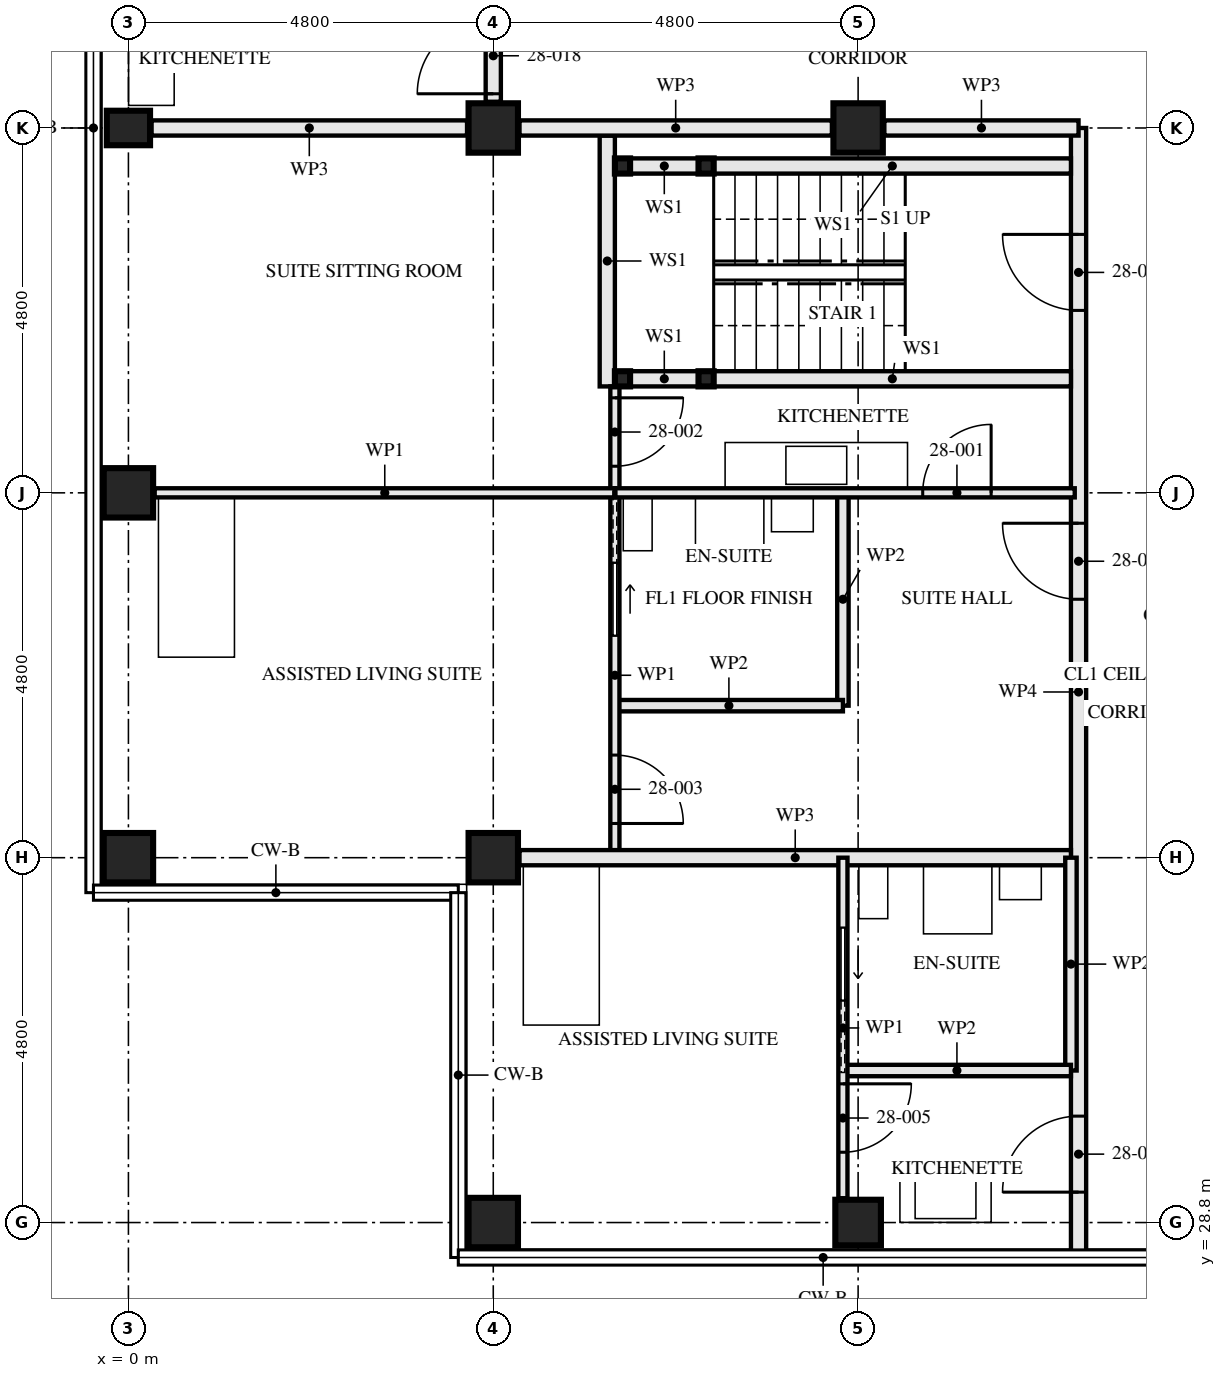
"""IFC4 building model, lengths in metres.
Left out: names, types, materials, properties, quantities, classifications, styles, units other than length and angle.
Written with IfcOpenShell. Run it as: python <this file> out.ifc"""

import sys

from ifc_helpers import new_model, si_unit, direction, frame, frame_2d, origin, origin_2d, place, context, subcontext, project, spatial, rectangle, hollow_rectangle, i_section, extrude, element, fill, save


model = new_model("IFC4")
c1 = context("Model", 3, precision=1e-05, world=origin(), true_north=direction((0.0, 1.0)))
c2 = subcontext(c1, "Body", "Model", "MODEL_VIEW")
j1 = project(units=[si_unit("LENGTHUNIT", "METRE"), si_unit("PLANEANGLEUNIT", "RADIAN")], contexts=[c1])
p1 = place(None, origin())
s1 = spatial("IfcSite", under=j1, at=p1, CompositionType="ELEMENT")
p2 = place(p1, origin())
s2 = spatial("IfcBuilding", under=s1, at=p2, CompositionType="ELEMENT")
p3 = place(p2, frame((0.0, 0.0, 105.0)))
s3 = spatial("IfcBuildingStorey", under=s2, at=p3, CompositionType="ELEMENT", Elevation=105.0)
for number, where, z_axis, x_axis in (
    (1, (0.0, 33.6, 0.0), (0.0, 0.0, 1.0), (0.0, 1.0, 0.0)),
    (2, (0.0, 38.4, 0.0), (0.0, 0.0, 1.0), (1.0, 0.0, 0.0)),
):
    element("IfcColumn", number, at=place(p3, frame(where, z_axis=z_axis, x_axis=x_axis)), inside=s3, PredefinedType="COLUMN", context=c2, shape_type="SweptSolid", body=[
        extrude(hollow_rectangle(XDim=0.65, YDim=0.65, WallThickness=0.08, at=origin_2d()), origin(), (0.0, 0.0, 1.0), 3.5),
    ])
p4 = place(p3, frame((0.0, 43.2, 0.0), z_axis=(0.0, 0.0, 1.0), x_axis=(0.0, 1.0, 0.0)))
e3 = element("IfcColumn", 3, at=p4, inside=s3, PredefinedType="COLUMN", context=c2, shape_type="SweptSolid", body=[
    extrude(i_section(OverallWidth=0.454, OverallDepth=0.569, WebThickness=0.078, FlangeThickness=0.125, FilletRadius=0.015, at=origin_2d()), origin(), (0.0, 0.0, 1.0), 3.5),
])
for number, where, z_axis, x_axis in (
    (4, (4.8, 28.8, 0.0), (0.0, 0.0, 1.0), (0.0, 1.0, 0.0)),
    (5, (4.8, 33.6, 0.0), (0.0, 0.0, 1.0), (0.0, 1.0, 0.0)),
):
    element("IfcColumn", number, at=place(p3, frame(where, z_axis=z_axis, x_axis=x_axis)), inside=s3, PredefinedType="COLUMN", context=c2, shape_type="SweptSolid", body=[
        extrude(hollow_rectangle(XDim=0.65, YDim=0.65, WallThickness=0.08, at=origin_2d()), origin(), (0.0, 0.0, 1.0), 3.5),
    ])
p5 = place(p3, frame((4.8, 43.2, 0.0), z_axis=(0.0, 0.0, 1.0), x_axis=(0.0, 1.0, 0.0)))
e6 = element("IfcColumn", 6, at=p5, inside=s3, PredefinedType="COLUMN", context=c2, shape_type="SweptSolid", body=[
    extrude(hollow_rectangle(XDim=0.65, YDim=0.65, WallThickness=0.05, at=origin_2d()), origin(), (0.0, 0.0, 1.0), 3.5),
])
p6 = place(p3, frame((9.6, 28.8, 0.0), z_axis=(0.0, 0.0, 1.0), x_axis=(0.0, 1.0, 0.0)))
e7 = element("IfcColumn", 7, at=p6, inside=s3, PredefinedType="COLUMN", context=c2, shape_type="SweptSolid", body=[
    extrude(hollow_rectangle(XDim=0.6, YDim=0.6, WallThickness=0.08, at=origin_2d()), origin(), (0.0, 0.0, 1.0), 3.5),
])
p7 = place(p3, frame((9.6, 43.2, 0.0), z_axis=(0.0, 0.0, 1.0), x_axis=(0.0, 1.0, 0.0)))
e8 = element("IfcColumn", 8, at=p7, inside=s3, PredefinedType="COLUMN", context=c2, shape_type="SweptSolid", body=[
    extrude(hollow_rectangle(XDim=0.65, YDim=0.65, WallThickness=0.05, at=origin_2d()), origin(), (0.0, 0.0, 1.0), 3.5),
])
for number, where, z_axis, x_axis in (
    (9, (6.5, 42.7, 0.0), (0.0, 0.0, 1.0), (1.0, 0.0, 0.0)),
    (10, (6.5, 39.9, 0.0), (0.0, 0.0, 1.0), (1.0, 0.0, 0.0)),
    (11, (7.6, 42.7, 0.0), (0.0, 0.0, 1.0), (1.0, 0.0, 0.0)),
    (12, (7.6, 39.9, 0.0), (0.0, 0.0, 1.0), (1.0, 0.0, 0.0)),
):
    element("IfcColumn", number, at=place(p3, frame(where, z_axis=z_axis, x_axis=x_axis)), inside=s3, PredefinedType="COLUMN", context=c2, shape_type="SweptSolid", body=[
        extrude(hollow_rectangle(XDim=0.2, YDim=0.2, WallThickness=0.008, at=origin_2d()), origin(), (0.0, 0.0, 1.0), 3.33),
    ])
p8 = place(p3, frame((6.6, 42.7, 0.0), z_axis=(0.0, 0.0, 1.0), x_axis=(1.0, 0.0, 0.0)))
e13 = element("IfcWall", 13, at=p8, inside=s3, PredefinedType="SOLIDWALL", context=c2, shape_type="SweptSolid", body=[
    extrude(rectangle(XDim=0.9, YDim=0.2, at=frame_2d((0.45, 0.0))), origin(), (0.0, 0.0, 1.0), 2.99),
])
p9 = place(p3, frame((7.7, 42.7, 0.0), z_axis=(0.0, 0.0, 1.0), x_axis=(1.0, 0.0, 0.0)))
e14 = element("IfcWall", 14, at=p9, inside=s3, PredefinedType="SOLIDWALL", context=c2, shape_type="SweptSolid", body=[
    extrude(rectangle(XDim=4.7, YDim=0.2, at=frame_2d((2.35, 0.0))), origin(), (0.0, 0.0, 1.0), 2.99),
])
p10 = place(p3, frame((6.6, 39.9, 0.0), z_axis=(0.0, 0.0, 1.0), x_axis=(1.0, 0.0, 0.0)))
e15 = element("IfcWall", 15, at=p10, inside=s3, PredefinedType="SOLIDWALL", context=c2, shape_type="SweptSolid", body=[
    extrude(rectangle(XDim=0.9, YDim=0.2, at=frame_2d((0.45, 0.0))), origin(), (0.0, 0.0, 1.0), 2.99),
])
p11 = place(p3, frame((7.7, 39.9, 0.0), z_axis=(0.0, 0.0, 1.0), x_axis=(1.0, 0.0, 0.0)))
e16 = element("IfcWall", 16, at=p11, inside=s3, PredefinedType="SOLIDWALL", context=c2, shape_type="SweptSolid", body=[
    extrude(rectangle(XDim=4.7, YDim=0.2, at=frame_2d((2.35, 0.0))), origin(), (0.0, 0.0, 1.0), 2.99),
])
p12 = place(p3, frame((6.3, 43.1, 0.0), z_axis=(0.0, 0.0, 1.0), x_axis=(0.0, -1.0, 0.0)))
e17 = element("IfcWall", 17, at=p12, inside=s3, PredefinedType="SOLIDWALL", context=c2, shape_type="SweptSolid", body=[
    extrude(rectangle(XDim=3.3, YDim=0.2, at=frame_2d((1.65, 0.0))), origin(), (0.0, 0.0, 1.0), 3.33),
])
p13 = place(p3, frame((6.4, 35.6, 0.0), z_axis=(0.0, 0.0, 1.0), x_axis=(1.0, 0.0, 0.0)))
e18 = element("IfcWall", 18, at=p13, inside=s3, PredefinedType="PARTITIONING", context=c2, shape_type="SweptSolid", body=[
    extrude(rectangle(XDim=3.0, YDim=0.15, at=frame_2d((1.5, 0.0))), origin(), (0.0, 0.0, 1.0), 3.33),
])
p14 = place(p3, frame((9.4, 38.4, 0.0), z_axis=(0.0, 0.0, 1.0), x_axis=(0.0, -1.0, 0.0)))
e19 = element("IfcWall", 19, at=p14, inside=s3, PredefinedType="PARTITIONING", context=c2, shape_type="SweptSolid", body=[
    extrude(rectangle(XDim=2.8, YDim=0.15, at=frame_2d((1.4, 0.0))), origin(), (0.0, 0.0, 1.0), 3.33),
])
p15 = place(p3, frame((6.4, 38.4, 0.0), z_axis=(0.0, 0.0, 1.0), x_axis=(1.0, 0.0, 0.0)))
e20 = element("IfcWall", 20, at=p15, inside=s3, PredefinedType="PARTITIONING", context=c2, shape_type="SweptSolid", body=[
    extrude(rectangle(XDim=6.05, YDim=0.12, at=frame_2d((3.025, 0.0))), origin(), (0.0, 0.0, 1.0), 2.55),
])
p16 = place(p15, frame((4.05, 0.0, 0.0)))
e21 = element("IfcOpeningElement", 21, at=p16, cuts=e20, PredefinedType="OPENING", context=c2, shape_type="SweptSolid", body=[
    extrude(rectangle(XDim=0.9, YDim=2.1, at=frame_2d((0.45, 1.05))), frame((0.0, 0.071, 0.0), z_axis=(0.0, -1.0, 0.0), x_axis=(1.0, 0.0, 0.0)), (0.0, 0.0, 1.0), 0.141),
])
p17 = place(p3, frame((6.4, 39.8, 0.0), z_axis=(0.0, 0.0, 1.0), x_axis=(0.0, -1.0, 0.0)))
e22 = element("IfcWall", 22, at=p17, inside=s3, PredefinedType="PARTITIONING", context=c2, shape_type="SweptSolid", body=[
    extrude(rectangle(XDim=1.4, YDim=0.12, at=frame_2d((0.7, 0.0))), origin(), (0.0, 0.0, 1.0), 3.33),
])
p18 = place(p17, frame((0.15, 0.0, 0.0)))
e23 = element("IfcOpeningElement", 23, at=p18, cuts=e22, PredefinedType="OPENING", context=c2, shape_type="SweptSolid", body=[
    extrude(rectangle(XDim=0.9, YDim=2.1, at=frame_2d((0.45, 1.05))), frame((0.0, 0.071, 0.0), z_axis=(0.0, -1.0, 0.0), x_axis=(1.0, 0.0, 0.0)), (0.0, 0.0, 1.0), 0.141),
])
p19 = place(p3, frame((6.4, 38.4, 0.0), z_axis=(0.0, 0.0, 1.0), x_axis=(0.0, -1.0, 0.0)))
e24 = element("IfcWall", 24, at=p19, inside=s3, PredefinedType="PARTITIONING", context=c2, shape_type="SweptSolid", body=[
    extrude(rectangle(XDim=4.8, YDim=0.12, at=frame_2d((2.4, 0.0))), origin(), (0.0, 0.0, 1.0), 3.33),
])
p20 = place(p19, frame((3.45, 0.0, 0.0)))
e25 = element("IfcOpeningElement", 25, at=p20, cuts=e24, PredefinedType="OPENING", context=c2, shape_type="SweptSolid", body=[
    extrude(rectangle(XDim=0.9, YDim=2.1, at=frame_2d((0.45, 1.05))), frame((0.0, 0.071, 0.0), z_axis=(0.0, -1.0, 0.0), x_axis=(1.0, 0.0, 0.0)), (0.0, 0.0, 1.0), 0.141),
])
p21 = place(p19, frame((0.925, 0.0, 0.0)))
e26 = element("IfcOpeningElement", 26, at=p21, cuts=e24, PredefinedType="OPENING", context=c2, shape_type="SweptSolid", body=[
    extrude(rectangle(XDim=0.95, YDim=2.1, at=frame_2d((0.475, 1.05))), frame((0.0, 0.071, 0.0), z_axis=(0.0, -1.0, 0.0), x_axis=(1.0, 0.0, 0.0)), (0.0, 0.0, 1.0), 0.141),
])
p22 = place(p3, frame((0.345, 38.4, 0.0), z_axis=(0.0, 0.0, 1.0), x_axis=(1.0, 0.0, 0.0)))
e27 = element("IfcWall", 27, at=p22, inside=s3, PredefinedType="PARTITIONING", context=c2, shape_type="SweptSolid", body=[
    extrude(rectangle(XDim=6.055, YDim=0.12, at=frame_2d((3.027, 0.0))), origin(), (0.0, 0.0, 1.0), 2.55),
])
p23 = place(p3, frame((5.145, 33.6, 0.0), z_axis=(0.0, 0.0, 1.0), x_axis=(1.0, 0.0, 0.0)))
e28 = element("IfcWall", 28, at=p23, inside=s3, PredefinedType="PARTITIONING", context=c2, shape_type="SweptSolid", body=[
    extrude(rectangle(XDim=7.255, YDim=0.2, at=frame_2d((3.627, 0.0))), origin(), (0.0, 0.0, 1.0), 2.55),
])
p24 = place(p3, frame((9.4, 30.8, 0.0), z_axis=(0.0, 0.0, 1.0), x_axis=(1.0, 0.0, 0.0)))
e29 = element("IfcWall", 29, at=p24, inside=s3, PredefinedType="PARTITIONING", context=c2, shape_type="SweptSolid", body=[
    extrude(rectangle(XDim=3.0, YDim=0.15, at=frame_2d((1.5, 0.0))), origin(), (0.0, 0.0, 1.0), 3.33),
])
p25 = place(p3, frame((12.4, 33.6, 0.0), z_axis=(0.0, 0.0, 1.0), x_axis=(0.0, -1.0, 0.0)))
e30 = element("IfcWall", 30, at=p25, inside=s3, PredefinedType="PARTITIONING", context=c2, shape_type="SweptSolid", body=[
    extrude(rectangle(XDim=2.8, YDim=0.15, at=frame_2d((1.4, 0.0))), origin(), (0.0, 0.0, 1.0), 3.33),
])
p26 = place(p3, frame((9.4, 33.6, 0.0), z_axis=(0.0, 0.0, 1.0), x_axis=(0.0, -1.0, 0.0)))
e31 = element("IfcWall", 31, at=p26, inside=s3, PredefinedType="PARTITIONING", context=c2, shape_type="SweptSolid", body=[
    extrude(rectangle(XDim=4.48, YDim=0.12, at=frame_2d((2.24, 0.0))), origin(), (0.0, 0.0, 1.0), 3.33),
])
p27 = place(p26, frame((2.975, 0.0, 0.0)))
e32 = element("IfcOpeningElement", 32, at=p27, cuts=e31, PredefinedType="OPENING", context=c2, shape_type="SweptSolid", body=[
    extrude(rectangle(XDim=0.9, YDim=2.1, at=frame_2d((0.45, 1.05))), frame((0.0, 0.071, 0.0), z_axis=(0.0, -1.0, 0.0), x_axis=(1.0, 0.0, 0.0)), (0.0, 0.0, 1.0), 0.141),
])
p28 = place(p26, frame((0.925, 0.0, 0.0)))
e33 = element("IfcOpeningElement", 33, at=p28, cuts=e31, PredefinedType="OPENING", context=c2, shape_type="SweptSolid", body=[
    extrude(rectangle(XDim=0.95, YDim=2.1, at=frame_2d((0.475, 1.05))), frame((0.0, 0.071, 0.0), z_axis=(0.0, -1.0, 0.0), x_axis=(1.0, 0.0, 0.0)), (0.0, 0.0, 1.0), 0.141),
])
p29 = place(p3, frame((12.5, 43.2, 0.0), z_axis=(0.0, 0.0, 1.0), x_axis=(0.0, -1.0, 0.0)))
e34 = element("IfcWall", 34, at=p29, inside=s3, PredefinedType="PARTITIONING", context=c2, shape_type="SweptSolid", body=[
    extrude(rectangle(XDim=14.84, YDim=0.2, at=frame_2d((7.42, 0.0))), origin(), (0.0, 0.0, 1.0), 2.32),
])
p30 = place(p29, frame((1.4, 0.0, 0.0)))
e35 = element("IfcOpeningElement", 35, at=p30, cuts=e34, PredefinedType="OPENING", context=c2, shape_type="SweptSolid", body=[
    extrude(rectangle(XDim=1.0, YDim=2.1, at=frame_2d((0.5, 1.05))), frame((0.0, 0.111, 0.0), z_axis=(0.0, -1.0, 0.0), x_axis=(1.0, 0.0, 0.0)), (0.0, 0.0, 1.0), 0.221),
])
p31 = place(p29, frame((5.2, 0.0, 0.0)))
e36 = element("IfcOpeningElement", 36, at=p31, cuts=e34, PredefinedType="OPENING", context=c2, shape_type="SweptSolid", body=[
    extrude(rectangle(XDim=1.0, YDim=2.1, at=frame_2d((0.5, 1.05))), frame((0.0, 0.111, 0.0), z_axis=(0.0, -1.0, 0.0), x_axis=(1.0, 0.0, 0.0)), (0.0, 0.0, 1.0), 0.221),
])
p32 = place(p29, frame((13.0, 0.0, 0.0)))
e37 = element("IfcOpeningElement", 37, at=p32, cuts=e34, PredefinedType="OPENING", context=c2, shape_type="SweptSolid", body=[
    extrude(rectangle(XDim=1.0, YDim=2.1, at=frame_2d((0.5, 1.05))), frame((0.0, 0.111, 0.0), z_axis=(0.0, -1.0, 0.0), x_axis=(1.0, 0.0, 0.0)), (0.0, 0.0, 1.0), 0.221),
])
p33 = place(p3, frame((4.8, 45.2, 0.0), z_axis=(0.0, 0.0, 1.0), x_axis=(0.0, -1.0, 0.0)))
e38 = element("IfcWall", 38, at=p33, inside=s3, PredefinedType="PARTITIONING", context=c2, shape_type="SweptSolid", body=[
    extrude(rectangle(XDim=1.655, YDim=0.2, at=frame_2d((0.828, 0.0))), origin(), (0.0, 0.0, 1.0), 3.33),
])
p34 = place(p33, frame((0.55, 0.0, 0.0)))
e39 = element("IfcOpeningElement", 39, at=p34, cuts=e38, PredefinedType="OPENING", context=c2, shape_type="SweptSolid", body=[
    extrude(rectangle(XDim=1.0, YDim=2.1, at=frame_2d((0.5, 1.05))), frame((0.0, 0.111, 0.0), z_axis=(0.0, -1.0, 0.0), x_axis=(1.0, 0.0, 0.0)), (0.0, 0.0, 1.0), 0.221),
])
p35 = place(p3, frame((12.5, 43.2, 0.0), z_axis=(0.0, 0.0, 1.0), x_axis=(-1.0, 0.0, 0.0)))
e40 = element("IfcWall", 40, at=p35, inside=s3, PredefinedType="PARTITIONING", context=c2, shape_type="SweptSolid", body=[
    extrude(rectangle(XDim=2.555, YDim=0.2, at=frame_2d((1.277, 0.0))), origin(), (0.0, 0.0, 1.0), 2.32),
])
p36 = place(p3, frame((9.255, 43.2, 0.0), z_axis=(0.0, 0.0, 1.0), x_axis=(-1.0, 0.0, 0.0)))
e41 = element("IfcWall", 41, at=p36, inside=s3, PredefinedType="PARTITIONING", context=c2, shape_type="SweptSolid", body=[
    extrude(rectangle(XDim=4.11, YDim=0.2, at=frame_2d((2.055, 0.0))), origin(), (0.0, 0.0, 1.0), 2.32),
])
p37 = place(p3, frame((4.455, 43.2, 0.0), z_axis=(0.0, 0.0, 1.0), x_axis=(-1.0, 0.0, 0.0)))
e42 = element("IfcWall", 42, at=p37, inside=s3, PredefinedType="PARTITIONING", context=c2, shape_type="SweptSolid", body=[
    extrude(rectangle(XDim=4.151, YDim=0.2, at=frame_2d((2.075, 0.0))), origin(), (0.0, 0.0, 1.0), 2.32),
])
p38 = place(p16, origin())
e43 = element("IfcDoor", 43, at=p38, inside=s3, OperationType="SINGLE_SWING_LEFT", PredefinedType="DOOR", context=c2, shape_type="SweptSolid", body=[
    extrude(rectangle(XDim=0.9, YDim=2.1, at=frame_2d((0.45, 1.05))), frame((0.0, 0.022, 0.0), z_axis=(0.0, -1.0, 0.0), x_axis=(1.0, 0.0, 0.0)), (0.0, 0.0, 1.0), 0.044),
])
fill(e21, e43)
p39 = place(p18, origin())
e44 = element("IfcDoor", 44, at=p39, inside=s3, OperationType="SINGLE_SWING_RIGHT", PredefinedType="DOOR", context=c2, shape_type="SweptSolid", body=[
    extrude(rectangle(XDim=0.9, YDim=2.1, at=frame_2d((0.45, 1.05))), frame((0.0, 0.022, 0.0), z_axis=(0.0, -1.0, 0.0), x_axis=(1.0, 0.0, 0.0)), (0.0, 0.0, 1.0), 0.044),
])
fill(e23, e44)
p40 = place(p20, origin())
e45 = element("IfcDoor", 45, at=p40, inside=s3, OperationType="SINGLE_SWING_LEFT", PredefinedType="DOOR", context=c2, shape_type="SweptSolid", body=[
    extrude(rectangle(XDim=0.9, YDim=2.1, at=frame_2d((0.45, 1.05))), frame((0.0, 0.022, 0.0), z_axis=(0.0, -1.0, 0.0), x_axis=(1.0, 0.0, 0.0)), (0.0, 0.0, 1.0), 0.044),
])
fill(e25, e45)
p41 = place(p21, origin())
e46 = element("IfcDoor", 46, at=p41, inside=s3, OperationType="SLIDING_TO_RIGHT", PredefinedType="DOOR", context=c2, shape_type="SweptSolid", body=[
    extrude(rectangle(XDim=0.95, YDim=2.1, at=frame_2d((0.475, 1.05))), frame((0.0, 0.022, 0.0), z_axis=(0.0, -1.0, 0.0), x_axis=(1.0, 0.0, 0.0)), (0.0, 0.0, 1.0), 0.044),
])
fill(e26, e46)
p42 = place(p27, origin())
e47 = element("IfcDoor", 47, at=p42, inside=s3, OperationType="SINGLE_SWING_RIGHT", PredefinedType="DOOR", context=c2, shape_type="SweptSolid", body=[
    extrude(rectangle(XDim=0.9, YDim=2.1, at=frame_2d((0.45, 1.05))), frame((0.0, 0.022, 0.0), z_axis=(0.0, -1.0, 0.0), x_axis=(1.0, 0.0, 0.0)), (0.0, 0.0, 1.0), 0.044),
])
fill(e32, e47)
p43 = place(p28, origin())
e48 = element("IfcDoor", 48, at=p43, inside=s3, OperationType="SLIDING_TO_LEFT", PredefinedType="DOOR", context=c2, shape_type="SweptSolid", body=[
    extrude(rectangle(XDim=0.95, YDim=2.1, at=frame_2d((0.475, 1.05))), frame((0.0, 0.022, 0.0), z_axis=(0.0, -1.0, 0.0), x_axis=(1.0, 0.0, 0.0)), (0.0, 0.0, 1.0), 0.044),
])
fill(e33, e48)
p44 = place(p30, frame((1.0, 0.0, 0.0), z_axis=(0.0, 0.0, 1.0), x_axis=(-1.0, 0.0, 0.0)))
e49 = element("IfcDoor", 49, at=p44, inside=s3, OperationType="SINGLE_SWING_LEFT", PredefinedType="DOOR", context=c2, shape_type="SweptSolid", body=[
    extrude(rectangle(XDim=1.0, YDim=2.1, at=frame_2d((0.5, 1.05))), frame((0.0, 0.032, 0.0), z_axis=(0.0, -1.0, 0.0), x_axis=(1.0, 0.0, 0.0)), (0.0, 0.0, 1.0), 0.064),
])
fill(e35, e49)
p45 = place(p31, frame((1.0, 0.0, 0.0), z_axis=(0.0, 0.0, 1.0), x_axis=(-1.0, 0.0, 0.0)))
e50 = element("IfcDoor", 50, at=p45, inside=s3, OperationType="SINGLE_SWING_LEFT", PredefinedType="DOOR", context=c2, shape_type="SweptSolid", body=[
    extrude(rectangle(XDim=1.0, YDim=2.1, at=frame_2d((0.5, 1.05))), frame((0.0, 0.027, 0.0), z_axis=(0.0, -1.0, 0.0), x_axis=(1.0, 0.0, 0.0)), (0.0, 0.0, 1.0), 0.054),
])
fill(e36, e50)
p46 = place(p32, frame((1.0, 0.0, 0.0), z_axis=(0.0, 0.0, 1.0), x_axis=(-1.0, 0.0, 0.0)))
e51 = element("IfcDoor", 51, at=p46, inside=s3, OperationType="SINGLE_SWING_RIGHT", PredefinedType="DOOR", context=c2, shape_type="SweptSolid", body=[
    extrude(rectangle(XDim=1.0, YDim=2.1, at=frame_2d((0.5, 1.05))), frame((0.0, 0.027, 0.0), z_axis=(0.0, -1.0, 0.0), x_axis=(1.0, 0.0, 0.0)), (0.0, 0.0, 1.0), 0.054),
])
fill(e37, e51)
p47 = place(p34, frame((1.0, 0.0, 0.0), z_axis=(0.0, 0.0, 1.0), x_axis=(-1.0, 0.0, 0.0)))
e52 = element("IfcDoor", 52, at=p47, inside=s3, OperationType="SINGLE_SWING_RIGHT", PredefinedType="DOOR", context=c2, shape_type="SweptSolid", body=[
    extrude(rectangle(XDim=1.0, YDim=2.1, at=frame_2d((0.5, 1.05))), frame((0.0, 0.027, 0.0), z_axis=(0.0, -1.0, 0.0), x_axis=(1.0, 0.0, 0.0)), (0.0, 0.0, 1.0), 0.054),
])
fill(e39, e52)
save(model, sys.argv[1])
